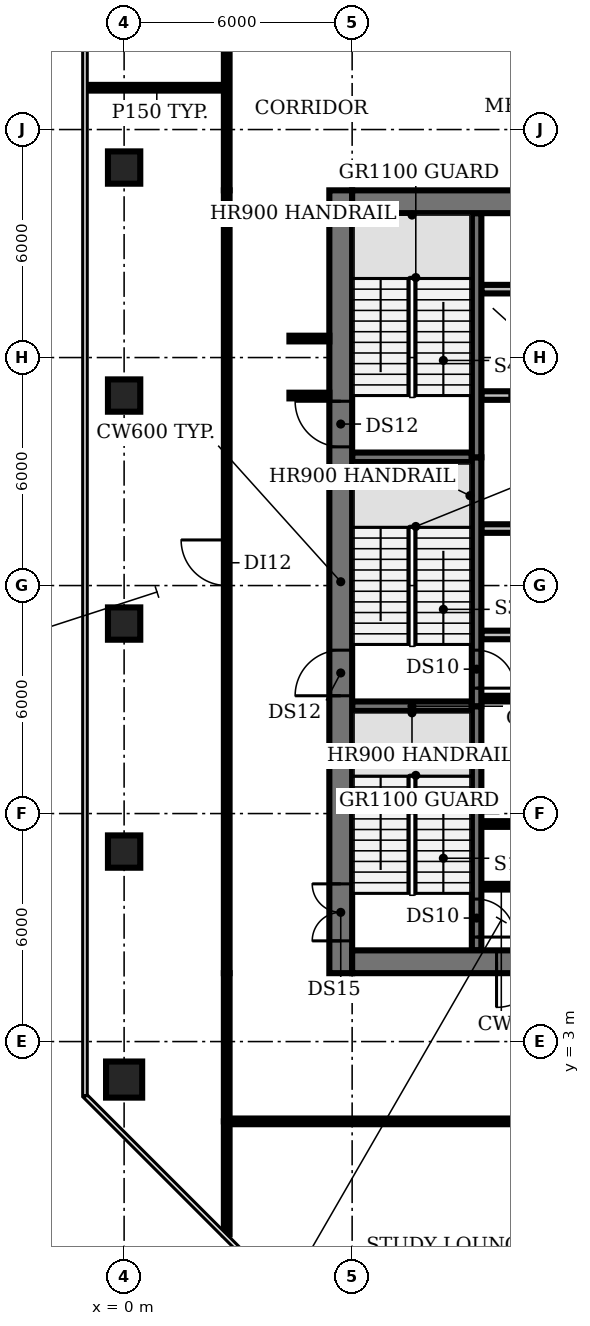
"""IFC4 building model, lengths in metres.
Left out: names, types, materials, properties, quantities, classifications, styles, units other than length and angle.
Written with IfcOpenShell. Run it as: python <this file> out.ifc"""

import sys

from ifc_helpers import new_model, si_unit, direction, frame, frame_2d, origin, origin_2d, place, context, subcontext, project, spatial, rectangle, circle, extrude, element, fill, save


model = new_model("IFC4")
c1 = context("Model", 3, precision=1e-05, world=origin(), true_north=direction((0.0, 1.0)))
c2 = subcontext(c1, "Body", "Model", "MODEL_VIEW")
j1 = project(units=[si_unit("LENGTHUNIT", "METRE"), si_unit("PLANEANGLEUNIT", "RADIAN")], contexts=[c1])
p1 = place(None, origin())
s1 = spatial("IfcSite", under=j1, at=p1, CompositionType="ELEMENT")
p2 = place(p1, origin())
s2 = spatial("IfcBuilding", under=s1, at=p2, CompositionType="ELEMENT")
p3 = place(p2, frame((0.0, 0.0, 184.4)))
s3 = spatial("IfcBuildingStorey", under=s2, at=p3, CompositionType="ELEMENT", Elevation=184.4)
p4 = place(p3, frame((0.0, 2.0, 0.0), z_axis=(0.0, 0.0, 1.0), x_axis=(1.0, 0.0, 0.0)))
e1 = element("IfcColumn", 1, at=p4, inside=s3, PredefinedType="COLUMN", context=c2, shape_type="SweptSolid", body=[
    extrude(circle(Radius=0.475, at=origin_2d()), origin(), (0.0, 0.0, 1.0), 3.85),
])
for number, where, z_axis, x_axis in (
    (2, (0.0, 8.0, 0.0), (0.0, 0.0, 1.0), (1.0, 0.0, 0.0)),
    (3, (0.0, 14.0, 0.0), (0.0, 0.0, 1.0), (1.0, 0.0, 0.0)),
    (4, (0.0, 20.0, 0.0), (0.0, 0.0, 1.0), (1.0, 0.0, 0.0)),
    (5, (0.0, 26.0, 0.0), (0.0, 0.0, 1.0), (1.0, 0.0, 0.0)),
):
    element("IfcColumn", number, at=place(p3, frame(where, z_axis=z_axis, x_axis=x_axis)), inside=s3, PredefinedType="COLUMN", context=c2, shape_type="SweptSolid", body=[
        extrude(rectangle(XDim=0.85, YDim=0.85, at=origin_2d()), origin(), (0.0, 0.0, 1.0), 3.85),
    ])
for number, where, z_axis, x_axis in (
    (6, (9.4, 7.075, 0.0), (0.0, 0.0, 1.0), (1.0, 0.0, 0.0)),
    (7, (9.4, 8.725, 0.0), (0.0, 0.0, 1.0), (1.0, 0.0, 0.0)),
    (8, (9.4, 10.375, 0.0), (0.0, 0.0, 1.0), (1.0, 0.0, 0.0)),
):
    element("IfcWall", number, at=place(p3, frame(where, z_axis=z_axis, x_axis=x_axis)), inside=s3, PredefinedType="SHEAR", context=c2, shape_type="SweptSolid", body=[
        extrude(rectangle(XDim=1.05, YDim=0.15, at=frame_2d((0.525, 0.0))), origin(), (0.0, 0.0, 1.0), 3.85),
    ])
p5 = place(p3, frame((6.0, 11.825, 0.0), z_axis=(0.0, 0.0, 1.0), x_axis=(1.0, 0.0, 0.0)))
e9 = element("IfcWall", 9, at=p5, inside=s3, PredefinedType="SHEAR", context=c2, shape_type="SweptSolid", body=[
    extrude(rectangle(XDim=3.15, YDim=0.25, at=frame_2d((1.575, 0.0))), origin(), (0.0, 0.0, 1.0), 3.85),
])
p6 = place(p3, frame((9.4, 12.025, 0.0), z_axis=(0.0, 0.0, 1.0), x_axis=(1.0, 0.0, 0.0)))
e10 = element("IfcWall", 10, at=p6, inside=s3, PredefinedType="SHEAR", context=c2, shape_type="SweptSolid", body=[
    extrude(rectangle(XDim=1.05, YDim=0.15, at=frame_2d((0.525, 0.0))), origin(), (0.0, 0.0, 1.0), 3.85),
])
p7 = place(p3, frame((9.4, 13.7, 0.0), z_axis=(0.0, 0.0, 1.0), x_axis=(1.0, 0.0, 0.0)))
e11 = element("IfcWall", 11, at=p7, inside=s3, PredefinedType="PARTITIONING", context=c2, shape_type="SweptSolid", body=[
    extrude(rectangle(XDim=4.0, YDim=0.225, at=frame_2d((2.0, 0.0))), origin(), (0.0, 0.0, 1.0), 3.85),
])
p8 = place(p3, frame((9.4, 16.5, 0.0), z_axis=(0.0, 0.0, 1.0), x_axis=(1.0, 0.0, 0.0)))
e12 = element("IfcWall", 12, at=p8, inside=s3, PredefinedType="PARTITIONING", context=c2, shape_type="SweptSolid", body=[
    extrude(rectangle(XDim=14.6, YDim=0.225, at=frame_2d((7.3, 0.0))), origin(), (0.0, 0.0, 1.0), 3.85),
])
p9 = place(p8, frame((1.9, 0.0, 0.0)))
e13 = element("IfcOpeningElement", 13, at=p9, cuts=e12, PredefinedType="OPENING", context=c2, shape_type="SweptSolid", body=[
    extrude(rectangle(XDim=1.0, YDim=2.1, at=frame_2d((0.5, 1.05))), frame((0.0, 0.123, 0.0), z_axis=(0.0, -1.0, 0.0), x_axis=(1.0, 0.0, 0.0)), (0.0, 0.0, 1.0), 0.245),
])
p10 = place(p8, frame((7.475, 0.0, 0.0)))
e14 = element("IfcOpeningElement", 14, at=p10, cuts=e12, PredefinedType="OPENING", context=c2, shape_type="SweptSolid", body=[
    extrude(rectangle(XDim=1.0, YDim=2.1, at=frame_2d((0.5, 1.05))), frame((0.0, 0.123, 0.0), z_axis=(0.0, -1.0, 0.0), x_axis=(1.0, 0.0, 0.0)), (0.0, 0.0, 1.0), 0.245),
])
p11 = place(p8, frame((12.4, 0.0, 0.0)))
e15 = element("IfcOpeningElement", 15, at=p11, cuts=e12, PredefinedType="OPENING", context=c2, shape_type="SweptSolid", body=[
    extrude(rectangle(XDim=1.0, YDim=2.1, at=frame_2d((0.5, 1.05))), frame((0.0, 0.123, 0.0), z_axis=(0.0, -1.0, 0.0), x_axis=(1.0, 0.0, 0.0)), (0.0, 0.0, 1.0), 0.245),
])
p12 = place(p3, frame((6.0, 18.375, 0.0), z_axis=(0.0, 0.0, 1.0), x_axis=(1.0, 0.0, 0.0)))
e16 = element("IfcWall", 16, at=p12, inside=s3, PredefinedType="SHEAR", context=c2, shape_type="SweptSolid", body=[
    extrude(rectangle(XDim=3.15, YDim=0.25, at=frame_2d((1.575, 0.0))), origin(), (0.0, 0.0, 1.0), 3.85),
])
p13 = place(p3, frame((24.0, 20.0, 0.0), z_axis=(0.0, 0.0, 1.0), x_axis=(-1.0, 0.0, 0.0)))
e17 = element("IfcWall", 17, at=p13, inside=s3, PredefinedType="PARTITIONING", context=c2, shape_type="SweptSolid", body=[
    extrude(rectangle(XDim=14.6, YDim=0.225, at=frame_2d((7.3, 0.0))), origin(), (0.0, 0.0, 1.0), 3.85),
])
p14 = place(p13, frame((12.75, 0.0, 0.0)))
e18 = element("IfcOpeningElement", 18, at=p14, cuts=e17, PredefinedType="OPENING", context=c2, shape_type="SweptSolid", body=[
    extrude(rectangle(XDim=1.1, YDim=2.1, at=frame_2d((0.55, 1.05))), frame((0.0, 0.123, 0.0), z_axis=(0.0, -1.0, 0.0), x_axis=(1.0, 0.0, 0.0)), (0.0, 0.0, 1.0), 0.245),
])
p15 = place(p13, frame((9.95, 0.0, 0.0)))
e19 = element("IfcOpeningElement", 19, at=p15, cuts=e17, PredefinedType="OPENING", context=c2, shape_type="SweptSolid", body=[
    extrude(rectangle(XDim=1.1, YDim=2.1, at=frame_2d((0.55, 1.05))), frame((0.0, 0.123, 0.0), z_axis=(0.0, -1.0, 0.0), x_axis=(1.0, 0.0, 0.0)), (0.0, 0.0, 1.0), 0.245),
])
p16 = place(p13, frame((7.15, 0.0, 0.0)))
e20 = element("IfcOpeningElement", 20, at=p16, cuts=e17, PredefinedType="OPENING", context=c2, shape_type="SweptSolid", body=[
    extrude(rectangle(XDim=1.1, YDim=2.1, at=frame_2d((0.55, 1.05))), frame((0.0, 0.123, 0.0), z_axis=(0.0, -1.0, 0.0), x_axis=(1.0, 0.0, 0.0)), (0.0, 0.0, 1.0), 0.245),
])
p17 = place(p13, frame((4.35, 0.0, 0.0)))
e21 = element("IfcOpeningElement", 21, at=p17, cuts=e17, PredefinedType="OPENING", context=c2, shape_type="SweptSolid", body=[
    extrude(rectangle(XDim=1.1, YDim=2.1, at=frame_2d((0.55, 1.05))), frame((0.0, 0.123, 0.0), z_axis=(0.0, -1.0, 0.0), x_axis=(1.0, 0.0, 0.0)), (0.0, 0.0, 1.0), 0.245),
])
p18 = place(p13, frame((1.2, 0.0, 0.0)))
e22 = element("IfcOpeningElement", 22, at=p18, cuts=e17, PredefinedType="OPENING", context=c2, shape_type="SweptSolid", body=[
    extrude(rectangle(XDim=1.0, YDim=2.1, at=frame_2d((0.5, 1.05))), frame((0.0, 0.123, 0.0), z_axis=(0.0, -1.0, 0.0), x_axis=(1.0, 0.0, 0.0)), (0.0, 0.0, 1.0), 0.245),
])
p19 = place(p3, frame((9.4, 22.8, 0.0), z_axis=(0.0, 0.0, 1.0), x_axis=(1.0, 0.0, 0.0)))
e23 = element("IfcWall", 23, at=p19, inside=s3, PredefinedType="PARTITIONING", context=c2, shape_type="SweptSolid", body=[
    extrude(rectangle(XDim=14.6, YDim=0.225, at=frame_2d((7.3, 0.0))), origin(), (0.0, 0.0, 1.0), 3.85),
])
p20 = place(p3, frame((9.275, 11.825, 0.0), z_axis=(0.0, 0.0, 1.0), x_axis=(0.0, -1.0, 0.0)))
e24 = element("IfcWall", 24, at=p20, inside=s3, PredefinedType="SHEAR", context=c2, shape_type="SweptSolid", body=[
    extrude(rectangle(XDim=6.425, YDim=0.25, at=frame_2d((3.212, 0.0))), origin(), (0.0, 0.0, 1.0), 3.85),
])
p21 = place(p20, frame((5.075, 0.0, 0.0)))
e25 = element("IfcOpeningElement", 25, at=p21, cuts=e24, PredefinedType="OPENING", context=c2, shape_type="SweptSolid", body=[
    extrude(rectangle(XDim=1.0, YDim=2.1, at=frame_2d((0.5, 1.05))), frame((0.0, 0.135, 0.0), z_axis=(0.0, -1.0, 0.0), x_axis=(1.0, 0.0, 0.0)), (0.0, 0.0, 1.0), 0.27),
])
p22 = place(p3, frame((9.275, 18.375, 0.0), z_axis=(0.0, 0.0, 1.0), x_axis=(0.0, -1.0, 0.0)))
e26 = element("IfcWall", 26, at=p22, inside=s3, PredefinedType="SHEAR", context=c2, shape_type="SweptSolid", body=[
    extrude(rectangle(XDim=6.55, YDim=0.25, at=frame_2d((3.275, 0.0))), origin(), (0.0, 0.0, 1.0), 3.85),
])
p23 = place(p22, frame((5.075, 0.0, 0.0)))
e27 = element("IfcOpeningElement", 27, at=p23, cuts=e26, PredefinedType="OPENING", context=c2, shape_type="SweptSolid", body=[
    extrude(rectangle(XDim=1.0, YDim=2.1, at=frame_2d((0.5, 1.05))), frame((0.0, 0.135, 0.0), z_axis=(0.0, -1.0, 0.0), x_axis=(1.0, 0.0, 0.0)), (0.0, 0.0, 1.0), 0.27),
])
p24 = place(p3, frame((9.275, 18.375, 0.0), z_axis=(0.0, 0.0, 1.0), x_axis=(0.0, 1.0, 0.0)))
e28 = element("IfcWall", 28, at=p24, inside=s3, PredefinedType="SHEAR", context=c2, shape_type="SweptSolid", body=[
    extrude(rectangle(XDim=6.425, YDim=0.25, at=frame_2d((3.212, 0.0))), origin(), (0.0, 0.0, 1.0), 3.85),
])
p25 = place(p3, frame((5.7, 4.8, 0.0), z_axis=(0.0, 0.0, 1.0), x_axis=(0.0, 1.0, 0.0)))
e29 = element("IfcWall", 29, at=p25, inside=s3, PredefinedType="SHEAR", context=c2, shape_type="SweptSolid", body=[
    extrude(rectangle(XDim=20.6, YDim=0.6, at=frame_2d((10.3, 0.0))), origin(), (0.0, 0.0, 1.0), 3.85),
])
p26 = place(p25, frame((0.85, 0.0, 0.0)))
e30 = element("IfcOpeningElement", 30, at=p26, cuts=e29, PredefinedType="OPENING", context=c2, shape_type="SweptSolid", body=[
    extrude(rectangle(XDim=1.5, YDim=2.1, at=frame_2d((0.75, 1.05))), frame((0.0, 0.31, 0.0), z_axis=(0.0, -1.0, 0.0), x_axis=(1.0, 0.0, 0.0)), (0.0, 0.0, 1.0), 0.62),
])
p27 = place(p25, frame((7.3, 0.0, 0.0)))
e31 = element("IfcOpeningElement", 31, at=p27, cuts=e29, PredefinedType="OPENING", context=c2, shape_type="SweptSolid", body=[
    extrude(rectangle(XDim=1.2, YDim=2.1, at=frame_2d((0.6, 1.05))), frame((0.0, 0.31, 0.0), z_axis=(0.0, -1.0, 0.0), x_axis=(1.0, 0.0, 0.0)), (0.0, 0.0, 1.0), 0.62),
])
p28 = place(p25, frame((13.85, 0.0, 0.0)))
e32 = element("IfcOpeningElement", 32, at=p28, cuts=e29, PredefinedType="OPENING", context=c2, shape_type="SweptSolid", body=[
    extrude(rectangle(XDim=1.2, YDim=2.1, at=frame_2d((0.6, 1.05))), frame((0.0, 0.31, 0.0), z_axis=(0.0, -1.0, 0.0), x_axis=(1.0, 0.0, 0.0)), (0.0, 0.0, 1.0), 0.62),
])
p29 = place(p3, frame((24.0, 5.1, 0.0), z_axis=(0.0, 0.0, 1.0), x_axis=(-1.0, 0.0, 0.0)))
e33 = element("IfcWall", 33, at=p29, inside=s3, PredefinedType="SHEAR", context=c2, shape_type="SweptSolid", body=[
    extrude(rectangle(XDim=18.0, YDim=0.6, at=frame_2d((9.0, 0.0))), origin(), (0.0, 0.0, 1.0), 3.85),
])
p30 = place(p29, frame((13.0, 0.0, 0.0)))
e34 = element("IfcOpeningElement", 34, at=p30, cuts=e33, PredefinedType="OPENING", context=c2, shape_type="SweptSolid", body=[
    extrude(rectangle(XDim=1.2, YDim=2.1, at=frame_2d((0.6, 1.05))), frame((0.0, 0.31, 0.0), z_axis=(0.0, -1.0, 0.0), x_axis=(1.0, 0.0, 0.0)), (0.0, 0.0, 1.0), 0.62),
])
p31 = place(p29, frame((4.9, 0.0, 0.0)))
e35 = element("IfcOpeningElement", 35, at=p31, cuts=e33, PredefinedType="OPENING", context=c2, shape_type="SweptSolid", body=[
    extrude(rectangle(XDim=1.0, YDim=2.1, at=frame_2d((0.5, 1.05))), frame((0.0, 0.31, 0.0), z_axis=(0.0, -1.0, 0.0), x_axis=(1.0, 0.0, 0.0)), (0.0, 0.0, 1.0), 0.62),
])
p32 = place(p3, frame((6.0, 25.1, 0.0), z_axis=(0.0, 0.0, 1.0), x_axis=(1.0, 0.0, 0.0)))
e36 = element("IfcWall", 36, at=p32, inside=s3, PredefinedType="SHEAR", context=c2, shape_type="SweptSolid", body=[
    extrude(rectangle(XDim=18.0, YDim=0.6, at=frame_2d((9.0, 0.0))), origin(), (0.0, 0.0, 1.0), 3.85),
])
p33 = place(p3, frame((-0.98, 28.1, 0.0), z_axis=(0.0, 0.0, 1.0), x_axis=(1.0, 0.0, 0.0)))
e37 = element("IfcWall", 37, at=p33, inside=s3, PredefinedType="PARTITIONING", context=c2, shape_type="SweptSolid", body=[
    extrude(rectangle(XDim=3.68, YDim=0.15, at=frame_2d((1.84, 0.0))), origin(), (0.0, 0.0, 1.0), 2.88),
])
p34 = place(p3, frame((2.7, -2.072, 0.0), z_axis=(0.0, 0.0, 1.0), x_axis=(0.0, 1.0, 0.0)))
e38 = element("IfcWall", 38, at=p34, inside=s3, PredefinedType="PARTITIONING", context=c2, shape_type="SweptSolid", body=[
    extrude(rectangle(XDim=2.972, YDim=0.15, at=frame_2d((1.486, 0.0))), origin(), (0.0, 0.0, 1.0), 2.88),
])
p35 = place(p3, frame((2.7, 0.9, 0.0), z_axis=(0.0, 0.0, 1.0), x_axis=(0.0, 1.0, 0.0)))
e39 = element("IfcWall", 39, at=p35, inside=s3, PredefinedType="PARTITIONING", context=c2, shape_type="SweptSolid", body=[
    extrude(rectangle(XDim=3.9, YDim=0.15, at=frame_2d((1.95, 0.0))), origin(), (0.0, 0.0, 1.0), 2.88),
])
p36 = place(p3, frame((2.7, 4.8, 0.0), z_axis=(0.0, 0.0, 1.0), x_axis=(0.0, 1.0, 0.0)))
e40 = element("IfcWall", 40, at=p36, inside=s3, PredefinedType="PARTITIONING", context=c2, shape_type="SweptSolid", body=[
    extrude(rectangle(XDim=20.6, YDim=0.15, at=frame_2d((10.3, 0.0))), origin(), (0.0, 0.0, 1.0), 2.88),
])
p37 = place(p36, frame((10.2, 0.0, 0.0)))
e41 = element("IfcOpeningElement", 41, at=p37, cuts=e40, PredefinedType="OPENING", context=c2, shape_type="SweptSolid", body=[
    extrude(rectangle(XDim=1.2, YDim=2.1, at=frame_2d((0.6, 1.05))), frame((0.0, 0.085, 0.0), z_axis=(0.0, -1.0, 0.0), x_axis=(1.0, 0.0, 0.0)), (0.0, 0.0, 1.0), 0.17),
])
p38 = place(p3, frame((2.7, 25.4, 0.0), z_axis=(0.0, 0.0, 1.0), x_axis=(0.0, 1.0, 0.0)))
e42 = element("IfcWall", 42, at=p38, inside=s3, PredefinedType="PARTITIONING", context=c2, shape_type="SweptSolid", body=[
    extrude(rectangle(XDim=3.9, YDim=0.15, at=frame_2d((1.95, 0.0))), origin(), (0.0, 0.0, 1.0), 2.88),
])
for number, where, z_axis, x_axis in (
    (43, (4.35, 20.0, 0.0), (0.0, 0.0, 1.0), (1.0, 0.0, 0.0)),
    (44, (4.35, 21.5, 0.0), (0.0, 0.0, 1.0), (1.0, 0.0, 0.0)),
):
    element("IfcWall", number, at=place(p3, frame(where, z_axis=z_axis, x_axis=x_axis)), inside=s3, PredefinedType="PARTITIONING", context=c2, shape_type="SweptSolid", body=[
        extrude(rectangle(XDim=1.05, YDim=0.15, at=frame_2d((0.525, 0.0))), origin(), (0.0, 0.0, 1.0), 2.88),
    ])
p39 = place(p3, frame((27.3, 0.9, 0.0), z_axis=(0.0, 0.0, 1.0), x_axis=(-1.0, 0.0, 0.0)))
e45 = element("IfcWall", 45, at=p39, inside=s3, PredefinedType="PARTITIONING", context=c2, shape_type="SweptSolid", body=[
    extrude(rectangle(XDim=24.6, YDim=0.15, at=frame_2d((12.3, 0.0))), origin(), (0.0, 0.0, 1.0), 2.88),
])
p40 = place(p39, frame((11.8, 0.0, 0.0)))
e46 = element("IfcOpeningElement", 46, at=p40, cuts=e45, PredefinedType="OPENING", context=c2, shape_type="SweptSolid", body=[
    extrude(rectangle(XDim=1.2, YDim=2.1, at=frame_2d((0.6, 1.05))), frame((0.0, 0.085, 0.0), z_axis=(0.0, -1.0, 0.0), x_axis=(1.0, 0.0, 0.0)), (0.0, 0.0, 1.0), 0.17),
])
p41 = place(p21, origin())
e47 = element("IfcDoor", 47, at=p41, inside=s3, OperationType="SINGLE_SWING_RIGHT", PredefinedType="DOOR", context=c2, shape_type="SweptSolid", body=[
    extrude(rectangle(XDim=1.0, YDim=2.1, at=frame_2d((0.5, 1.05))), frame((0.0, 0.025, 0.0), z_axis=(0.0, -1.0, 0.0), x_axis=(1.0, 0.0, 0.0)), (0.0, 0.0, 1.0), 0.05),
])
fill(e25, e47)
p42 = place(p23, origin())
e48 = element("IfcDoor", 48, at=p42, inside=s3, OperationType="SINGLE_SWING_RIGHT", PredefinedType="DOOR", context=c2, shape_type="SweptSolid", body=[
    extrude(rectangle(XDim=1.0, YDim=2.1, at=frame_2d((0.5, 1.05))), frame((0.0, 0.025, 0.0), z_axis=(0.0, -1.0, 0.0), x_axis=(1.0, 0.0, 0.0)), (0.0, 0.0, 1.0), 0.05),
])
fill(e27, e48)
p43 = place(p26, origin())
e49 = element("IfcDoor", 49, at=p43, inside=s3, OperationType="DOUBLE_DOOR_SINGLE_SWING", PredefinedType="DOOR", context=c2, shape_type="SweptSolid", body=[
    extrude(rectangle(XDim=1.5, YDim=2.1, at=frame_2d((0.75, 1.05))), frame((0.0, 0.025, 0.0), z_axis=(0.0, -1.0, 0.0), x_axis=(1.0, 0.0, 0.0)), (0.0, 0.0, 1.0), 0.05),
])
fill(e30, e49)
p44 = place(p27, origin())
e50 = element("IfcDoor", 50, at=p44, inside=s3, OperationType="SINGLE_SWING_LEFT", PredefinedType="DOOR", context=c2, shape_type="SweptSolid", body=[
    extrude(rectangle(XDim=1.2, YDim=2.1, at=frame_2d((0.6, 1.05))), frame((0.0, 0.025, 0.0), z_axis=(0.0, -1.0, 0.0), x_axis=(1.0, 0.0, 0.0)), (0.0, 0.0, 1.0), 0.05),
])
fill(e31, e50)
p45 = place(p28, origin())
e51 = element("IfcDoor", 51, at=p45, inside=s3, OperationType="SINGLE_SWING_RIGHT", PredefinedType="DOOR", context=c2, shape_type="SweptSolid", body=[
    extrude(rectangle(XDim=1.2, YDim=2.1, at=frame_2d((0.6, 1.05))), frame((0.0, 0.025, 0.0), z_axis=(0.0, -1.0, 0.0), x_axis=(1.0, 0.0, 0.0)), (0.0, 0.0, 1.0), 0.05),
])
fill(e32, e51)
p46 = place(p30, origin())
e52 = element("IfcDoor", 52, at=p46, inside=s3, OperationType="SINGLE_SWING_RIGHT", PredefinedType="DOOR", context=c2, shape_type="SweptSolid", body=[
    extrude(rectangle(XDim=1.2, YDim=2.1, at=frame_2d((0.6, 1.05))), frame((0.0, 0.025, 0.0), z_axis=(0.0, -1.0, 0.0), x_axis=(1.0, 0.0, 0.0)), (0.0, 0.0, 1.0), 0.05),
])
fill(e34, e52)
p47 = place(p37, origin())
e53 = element("IfcDoor", 53, at=p47, inside=s3, OperationType="SINGLE_SWING_RIGHT", PredefinedType="DOOR", context=c2, shape_type="SweptSolid", body=[
    extrude(rectangle(XDim=1.2, YDim=2.1, at=frame_2d((0.6, 1.05))), frame((0.0, 0.025, 0.0), z_axis=(0.0, -1.0, 0.0), x_axis=(1.0, 0.0, 0.0)), (0.0, 0.0, 1.0), 0.05),
])
fill(e41, e53)
save(model, sys.argv[1])
